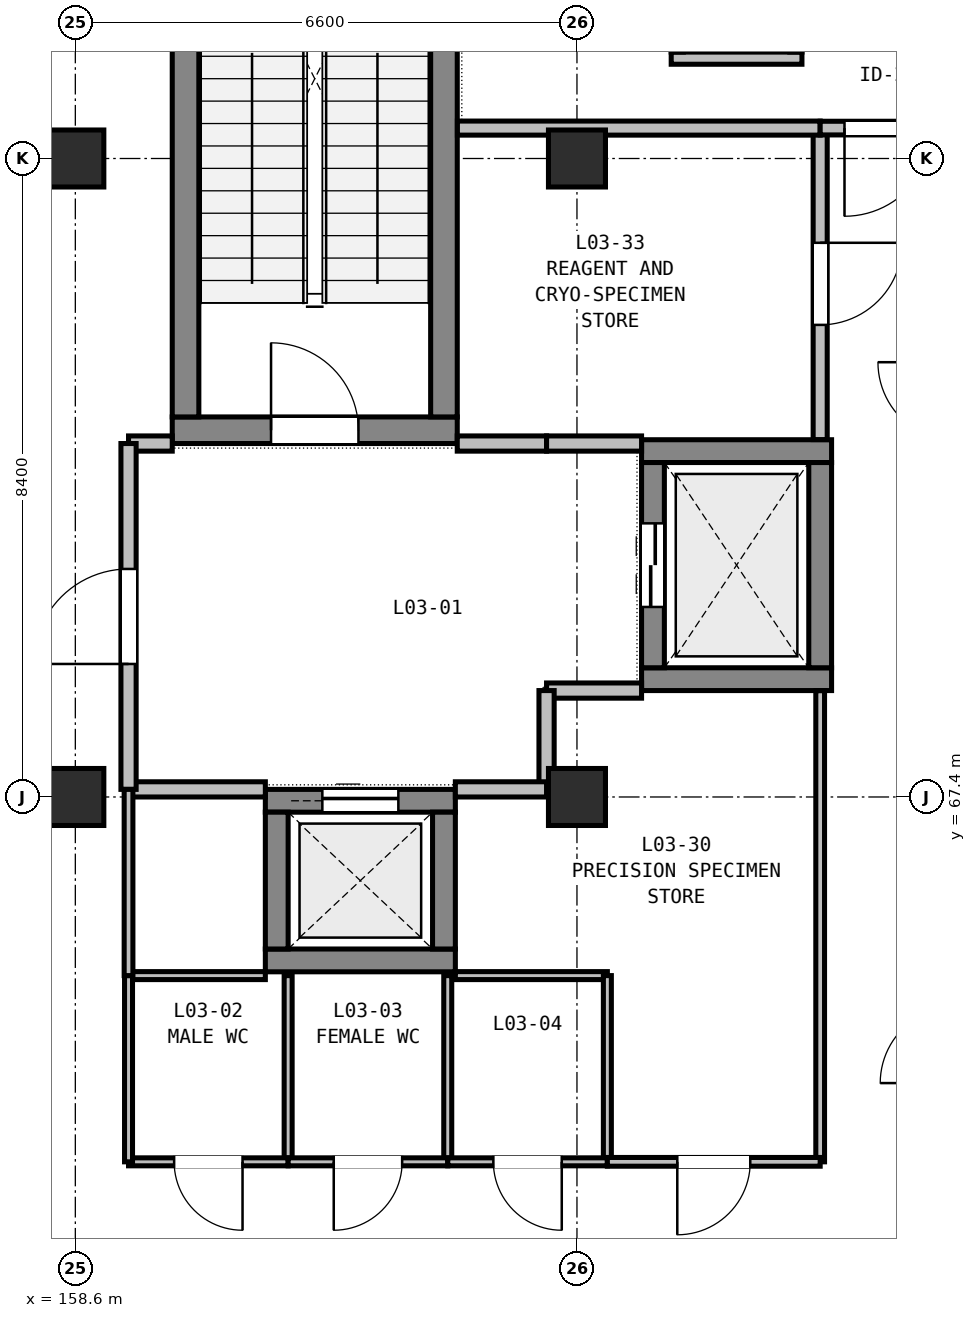
"""IFC4 building model, lengths in metres.
Left out: names, types, materials, properties, quantities, classifications, styles, units other than length and angle.
Written with IfcOpenShell. Run it as: python <this file> out.ifc"""

import sys

from ifc_helpers import new_model, si_unit, direction, frame, frame_2d, origin, origin_2d, place, context, subcontext, project, spatial, rectangle, extrude, element, fill, save


model = new_model("IFC4")
c1 = context("Model", 3, precision=1e-05, world=origin(), true_north=direction((0.0, 1.0)))
c2 = subcontext(c1, "Body", "Model", "MODEL_VIEW")
j1 = project(units=[si_unit("LENGTHUNIT", "METRE"), si_unit("PLANEANGLEUNIT", "RADIAN")], contexts=[c1])
p1 = place(None, origin())
s1 = spatial("IfcSite", under=j1, at=p1, CompositionType="ELEMENT")
p2 = place(p1, origin())
s2 = spatial("IfcBuilding", under=s1, at=p2, CompositionType="ELEMENT")
p3 = place(p2, frame((0.0, 0.0, 15.0)))
s3 = spatial("IfcBuildingStorey", under=s2, at=p3, CompositionType="ELEMENT", Elevation=15.0)
for number, where, z_axis, x_axis in (
    (1, (158.6, 67.4, 0.0), (0.0, 0.0, 1.0), (1.0, 0.0, 0.0)),
    (2, (158.6, 75.8, 0.0), (0.0, 0.0, 1.0), (1.0, 0.0, 0.0)),
    (3, (165.2, 67.4, 0.0), (0.0, 0.0, 1.0), (1.0, 0.0, 0.0)),
    (4, (165.2, 75.8, 0.0), (0.0, 0.0, 1.0), (1.0, 0.0, 0.0)),
):
    element("IfcColumn", number, at=place(p3, frame(where, z_axis=z_axis, x_axis=x_axis)), inside=s3, PredefinedType="COLUMN", context=c2, shape_type="SweptSolid", body=[
        extrude(rectangle(XDim=0.75, YDim=0.75, at=origin_2d()), origin(), (0.0, 0.0, 1.0), 4.5),
    ])
p4 = place(p3, frame((159.875, 72.225, 0.0), z_axis=(0.0, 0.0, 1.0), x_axis=(1.0, 0.0, 0.0)))
e5 = element("IfcWall", 5, at=p4, inside=s3, PredefinedType="SHEAR", context=c2, shape_type="SweptSolid", body=[
    extrude(rectangle(XDim=3.75, YDim=0.35, at=frame_2d((1.875, 0.0))), origin(), (0.0, 0.0, 1.0), 4.5),
])
p5 = place(p4, frame((1.3, 0.0, 0.0)))
e6 = element("IfcOpeningElement", 6, at=p5, cuts=e5, PredefinedType="OPENING", context=c2, shape_type="SweptSolid", body=[
    extrude(rectangle(XDim=1.15, YDim=2.15, at=frame_2d((0.575, 1.075))), frame((0.0, 0.185, 0.0), z_axis=(0.0, -1.0, 0.0), x_axis=(1.0, 0.0, 0.0)), (0.0, 0.0, 1.0), 0.37),
])
for number, where, z_axis, x_axis in (
    (7, (160.05, 72.4, 0.0), (0.0, 0.0, 1.0), (0.0, 1.0, 0.0)),
    (8, (163.45, 72.4, 0.0), (0.0, 0.0, 1.0), (0.0, 1.0, 0.0)),
):
    element("IfcWall", number, at=place(p3, frame(where, z_axis=z_axis, x_axis=x_axis)), inside=s3, PredefinedType="SHEAR", context=c2, shape_type="SweptSolid", body=[
        extrude(rectangle(XDim=7.375, YDim=0.35, at=frame_2d((3.688, 0.0))), origin(), (0.0, 0.0, 1.0), 4.5),
    ])
for number, where, z_axis, x_axis in (
    (9, (166.05, 68.95, 0.0), (0.0, 0.0, 1.0), (1.0, 0.0, 0.0)),
    (10, (166.05, 71.95, 0.0), (0.0, 0.0, 1.0), (1.0, 0.0, 0.0)),
):
    element("IfcWall", number, at=place(p3, frame(where, z_axis=z_axis, x_axis=x_axis)), inside=s3, PredefinedType="SHEAR", context=c2, shape_type="SweptSolid", body=[
        extrude(rectangle(XDim=2.5, YDim=0.3, at=frame_2d((1.25, 0.0))), origin(), (0.0, 0.0, 1.0), 4.5),
    ])
p6 = place(p3, frame((166.2, 69.1, 0.0), z_axis=(0.0, 0.0, 1.0), x_axis=(0.0, 1.0, 0.0)))
e11 = element("IfcWall", 11, at=p6, inside=s3, PredefinedType="SHEAR", context=c2, shape_type="SweptSolid", body=[
    extrude(rectangle(XDim=2.7, YDim=0.3, at=frame_2d((1.35, 0.0))), origin(), (0.0, 0.0, 1.0), 4.5),
])
p7 = place(p6, frame((0.8, 0.0, 0.0)))
e12 = element("IfcOpeningElement", 12, at=p7, cuts=e11, PredefinedType="OPENING", context=c2, shape_type="SweptSolid", body=[
    extrude(rectangle(XDim=1.1, YDim=2.1, at=frame_2d((0.55, 1.05))), frame((0.0, 0.16, 0.0), z_axis=(0.0, -1.0, 0.0), x_axis=(1.0, 0.0, 0.0)), (0.0, 0.0, 1.0), 0.32),
])
p8 = place(p3, frame((168.4, 69.1, 0.0), z_axis=(0.0, 0.0, 1.0), x_axis=(0.0, 1.0, 0.0)))
e13 = element("IfcWall", 13, at=p8, inside=s3, PredefinedType="SHEAR", context=c2, shape_type="SweptSolid", body=[
    extrude(rectangle(XDim=2.7, YDim=0.3, at=frame_2d((1.35, 0.0))), origin(), (0.0, 0.0, 1.0), 4.5),
])
p9 = place(p3, frame((161.1, 65.25, 0.0), z_axis=(0.0, 0.0, 1.0), x_axis=(1.0, 0.0, 0.0)))
e14 = element("IfcWall", 14, at=p9, inside=s3, PredefinedType="SHEAR", context=c2, shape_type="SweptSolid", body=[
    extrude(rectangle(XDim=2.5, YDim=0.3, at=frame_2d((1.25, 0.0))), origin(), (0.0, 0.0, 1.0), 4.5),
])
p10 = place(p3, frame((161.1, 67.35, 0.0), z_axis=(0.0, 0.0, 1.0), x_axis=(1.0, 0.0, 0.0)))
e15 = element("IfcWall", 15, at=p10, inside=s3, PredefinedType="SHEAR", context=c2, shape_type="SweptSolid", body=[
    extrude(rectangle(XDim=2.5, YDim=0.3, at=frame_2d((1.25, 0.0))), origin(), (0.0, 0.0, 1.0), 4.5),
])
p11 = place(p10, frame((0.75, 0.0, 0.0)))
e16 = element("IfcOpeningElement", 16, at=p11, cuts=e15, PredefinedType="OPENING", context=c2, shape_type="SweptSolid", body=[
    extrude(rectangle(XDim=1.0, YDim=2.1, at=frame_2d((0.5, 1.05))), frame((0.0, 0.16, 0.0), z_axis=(0.0, -1.0, 0.0), x_axis=(1.0, 0.0, 0.0)), (0.0, 0.0, 1.0), 0.32),
])
for number, where, z_axis, x_axis in (
    (17, (161.25, 65.4, 0.0), (0.0, 0.0, 1.0), (0.0, 1.0, 0.0)),
    (18, (163.45, 65.4, 0.0), (0.0, 0.0, 1.0), (0.0, 1.0, 0.0)),
):
    element("IfcWall", number, at=place(p3, frame(where, z_axis=z_axis, x_axis=x_axis)), inside=s3, PredefinedType="SHEAR", context=c2, shape_type="SweptSolid", body=[
        extrude(rectangle(XDim=1.8, YDim=0.3, at=frame_2d((0.9, 0.0))), origin(), (0.0, 0.0, 1.0), 4.5),
    ])
p12 = place(p3, frame((166.44, 77.12, 0.0), z_axis=(0.0, 0.0, 1.0), x_axis=(1.0, 0.0, 0.0)))
e19 = element("IfcWall", 19, at=p12, inside=s3, PredefinedType="PARTITIONING", context=c2, shape_type="SweptSolid", body=[
    extrude(rectangle(XDim=1.72, YDim=0.16, at=frame_2d((0.86, 0.0))), origin(), (0.0, 0.0, 1.0), 4.195),
])
p13 = place(p3, frame((159.3, 72.05, 0.0), z_axis=(0.0, 0.0, 1.0), x_axis=(1.0, 0.0, 0.0)))
e20 = element("IfcWall", 20, at=p13, inside=s3, PredefinedType="PARTITIONING", context=c2, shape_type="SweptSolid", body=[
    extrude(rectangle(XDim=0.575, YDim=0.2, at=frame_2d((0.288, 0.0))), origin(), (0.0, 0.0, 1.0), 4.195),
])
p14 = place(p3, frame((163.625, 72.05, 0.0), z_axis=(0.0, 0.0, 1.0), x_axis=(1.0, 0.0, 0.0)))
e21 = element("IfcWall", 21, at=p14, inside=s3, PredefinedType="PARTITIONING", context=c2, shape_type="SweptSolid", body=[
    extrude(rectangle(XDim=1.175, YDim=0.2, at=frame_2d((0.587, 0.0))), origin(), (0.0, 0.0, 1.0), 4.195),
])
for number, where, z_axis, x_axis in (
    (22, (164.8, 72.05, 0.0), (0.0, 0.0, 1.0), (1.0, 0.0, 0.0)),
    (23, (166.05, 68.8, 0.0), (0.0, 0.0, 1.0), (-1.0, 0.0, 0.0)),
):
    element("IfcWall", number, at=place(p3, frame(where, z_axis=z_axis, x_axis=x_axis)), inside=s3, PredefinedType="PARTITIONING", context=c2, shape_type="SweptSolid", body=[
        extrude(rectangle(XDim=1.25, YDim=0.2, at=frame_2d((0.625, 0.0))), origin(), (0.0, 0.0, 1.0), 3.735),
    ])
p15 = place(p3, frame((164.8, 68.8, 0.0), z_axis=(0.0, 0.0, 1.0), x_axis=(0.0, -1.0, 0.0)))
e24 = element("IfcWall", 24, at=p15, inside=s3, PredefinedType="PARTITIONING", context=c2, shape_type="SweptSolid", body=[
    extrude(rectangle(XDim=1.3, YDim=0.2, at=frame_2d((0.65, 0.0))), origin(), (0.0, 0.0, 1.0), 3.835),
])
p16 = place(p3, frame((164.8, 67.5, 0.0), z_axis=(0.0, 0.0, 1.0), x_axis=(-1.0, 0.0, 0.0)))
e25 = element("IfcWall", 25, at=p16, inside=s3, PredefinedType="PARTITIONING", context=c2, shape_type="SweptSolid", body=[
    extrude(rectangle(XDim=1.2, YDim=0.2, at=frame_2d((0.6, 0.0))), origin(), (0.0, 0.0, 1.0), 3.835),
])
p17 = place(p3, frame((161.1, 67.5, 0.0), z_axis=(0.0, 0.0, 1.0), x_axis=(-1.0, 0.0, 0.0)))
e26 = element("IfcWall", 26, at=p17, inside=s3, PredefinedType="PARTITIONING", context=c2, shape_type="SweptSolid", body=[
    extrude(rectangle(XDim=1.8, YDim=0.2, at=frame_2d((0.9, 0.0))), origin(), (0.0, 0.0, 1.0), 3.835),
])
p18 = place(p3, frame((159.3, 67.5, 0.0), z_axis=(0.0, 0.0, 1.0), x_axis=(0.0, 1.0, 0.0)))
e27 = element("IfcWall", 27, at=p18, inside=s3, PredefinedType="PARTITIONING", context=c2, shape_type="SweptSolid", body=[
    extrude(rectangle(XDim=4.55, YDim=0.2, at=frame_2d((2.275, 0.0))), origin(), (0.0, 0.0, 1.0), 3.835),
])
p19 = place(p18, frame((1.65, 0.0, 0.0)))
e28 = element("IfcOpeningElement", 28, at=p19, cuts=e27, PredefinedType="OPENING", context=c2, shape_type="SweptSolid", body=[
    extrude(rectangle(XDim=1.25, YDim=2.15, at=frame_2d((0.625, 1.075))), frame((0.0, 0.11, 0.0), z_axis=(0.0, -1.0, 0.0), x_axis=(1.0, 0.0, 0.0)), (0.0, 0.0, 1.0), 0.22),
])
p20 = place(p3, frame((159.3, 65.05, 0.0), z_axis=(0.0, 0.0, 1.0), x_axis=(1.0, 0.0, 0.0)))
e29 = element("IfcWall", 29, at=p20, inside=s3, PredefinedType="PARTITIONING", context=c2, shape_type="SweptSolid", body=[
    extrude(rectangle(XDim=1.8, YDim=0.105, at=frame_2d((0.9, 0.0))), origin(), (0.0, 0.0, 1.0), 4.195),
])
p21 = place(p3, frame((161.4, 65.05, 0.0), z_axis=(0.0, 0.0, 1.0), x_axis=(0.0, -1.0, 0.0)))
e30 = element("IfcWall", 30, at=p21, inside=s3, PredefinedType="PARTITIONING", context=c2, shape_type="SweptSolid", body=[
    extrude(rectangle(XDim=2.45, YDim=0.105, at=frame_2d((1.225, 0.0))), origin(), (0.0, 0.0, 1.0), 4.195),
])
p22 = place(p3, frame((161.4, 62.6, 0.0), z_axis=(0.0, 0.0, 1.0), x_axis=(-1.0, 0.0, 0.0)))
e31 = element("IfcWall", 31, at=p22, inside=s3, PredefinedType="PARTITIONING", context=c2, shape_type="SweptSolid", body=[
    extrude(rectangle(XDim=2.1, YDim=0.105, at=frame_2d((1.05, 0.0))), origin(), (0.0, 0.0, 1.0), 4.195),
])
p23 = place(p22, frame((0.6, 0.0, 0.0)))
e32 = element("IfcOpeningElement", 32, at=p23, cuts=e31, PredefinedType="OPENING", context=c2, shape_type="SweptSolid", body=[
    extrude(rectangle(XDim=0.9, YDim=2.02, at=frame_2d((0.45, 1.01))), frame((0.0, 0.062, 0.0), z_axis=(0.0, -1.0, 0.0), x_axis=(1.0, 0.0, 0.0)), (0.0, 0.0, 1.0), 0.125),
])
for number, where, z_axis, x_axis in (
    (33, (159.3, 62.6, 0.0), (0.0, 0.0, 1.0), (0.0, 1.0, 0.0)),
    (34, (163.5, 65.05, 0.0), (0.0, 0.0, 1.0), (0.0, -1.0, 0.0)),
):
    element("IfcWall", number, at=place(p3, frame(where, z_axis=z_axis, x_axis=x_axis)), inside=s3, PredefinedType="PARTITIONING", context=c2, shape_type="SweptSolid", body=[
        extrude(rectangle(XDim=2.45, YDim=0.105, at=frame_2d((1.225, 0.0))), origin(), (0.0, 0.0, 1.0), 4.195),
    ])
p24 = place(p3, frame((163.5, 62.6, 0.0), z_axis=(0.0, 0.0, 1.0), x_axis=(-1.0, 0.0, 0.0)))
e35 = element("IfcWall", 35, at=p24, inside=s3, PredefinedType="PARTITIONING", context=c2, shape_type="SweptSolid", body=[
    extrude(rectangle(XDim=2.1, YDim=0.105, at=frame_2d((1.05, 0.0))), origin(), (0.0, 0.0, 1.0), 4.195),
])
p25 = place(p24, frame((0.6, 0.0, 0.0)))
e36 = element("IfcOpeningElement", 36, at=p25, cuts=e35, PredefinedType="OPENING", context=c2, shape_type="SweptSolid", body=[
    extrude(rectangle(XDim=0.9, YDim=2.02, at=frame_2d((0.45, 1.01))), frame((0.0, 0.062, 0.0), z_axis=(0.0, -1.0, 0.0), x_axis=(1.0, 0.0, 0.0)), (0.0, 0.0, 1.0), 0.125),
])
p26 = place(p3, frame((163.6, 65.05, 0.0), z_axis=(0.0, 0.0, 1.0), x_axis=(1.0, 0.0, 0.0)))
e37 = element("IfcWall", 37, at=p26, inside=s3, PredefinedType="PARTITIONING", context=c2, shape_type="SweptSolid", body=[
    extrude(rectangle(XDim=2.0, YDim=0.105, at=frame_2d((1.0, 0.0))), origin(), (0.0, 0.0, 1.0), 3.735),
])
p27 = place(p3, frame((165.6, 65.05, 0.0), z_axis=(0.0, 0.0, 1.0), x_axis=(0.0, -1.0, 0.0)))
e38 = element("IfcWall", 38, at=p27, inside=s3, PredefinedType="PARTITIONING", context=c2, shape_type="SweptSolid", body=[
    extrude(rectangle(XDim=2.45, YDim=0.105, at=frame_2d((1.225, 0.0))), origin(), (0.0, 0.0, 1.0), 4.195),
])
p28 = place(p3, frame((165.6, 62.6, 0.0), z_axis=(0.0, 0.0, 1.0), x_axis=(-1.0, 0.0, 0.0)))
e39 = element("IfcWall", 39, at=p28, inside=s3, PredefinedType="PARTITIONING", context=c2, shape_type="SweptSolid", body=[
    extrude(rectangle(XDim=2.1, YDim=0.105, at=frame_2d((1.05, 0.0))), origin(), (0.0, 0.0, 1.0), 3.735),
])
p29 = place(p28, frame((0.6, 0.0, 0.0)))
e40 = element("IfcOpeningElement", 40, at=p29, cuts=e39, PredefinedType="OPENING", context=c2, shape_type="SweptSolid", body=[
    extrude(rectangle(XDim=0.9, YDim=2.02, at=frame_2d((0.45, 1.01))), frame((0.0, 0.062, 0.0), z_axis=(0.0, -1.0, 0.0), x_axis=(1.0, 0.0, 0.0)), (0.0, 0.0, 1.0), 0.125),
])
p30 = place(p3, frame((168.4, 68.798, 0.0), z_axis=(0.0, 0.0, 1.0), x_axis=(0.0, -1.0, 0.0)))
e41 = element("IfcWall", 41, at=p30, inside=s3, PredefinedType="PARTITIONING", context=c2, shape_type="SweptSolid", body=[
    extrude(rectangle(XDim=6.198, YDim=0.115, at=frame_2d((3.099, 0.0))), origin(), (0.0, 0.0, 1.0), 3.835),
])
p31 = place(p3, frame((168.4, 62.6, 0.0), z_axis=(0.0, 0.0, 1.0), x_axis=(-1.0, 0.0, 0.0)))
e42 = element("IfcWall", 42, at=p31, inside=s3, PredefinedType="PARTITIONING", context=c2, shape_type="SweptSolid", body=[
    extrude(rectangle(XDim=2.8, YDim=0.115, at=frame_2d((1.4, 0.0))), origin(), (0.0, 0.0, 1.0), 3.985),
])
p32 = place(p31, frame((0.92, 0.0, 0.0)))
e43 = element("IfcOpeningElement", 43, at=p32, cuts=e42, PredefinedType="OPENING", context=c2, shape_type="SweptSolid", body=[
    extrude(rectangle(XDim=0.96, YDim=2.14, at=frame_2d((0.48, 1.07))), frame((0.0, 0.067, 0.0), z_axis=(0.0, -1.0, 0.0), x_axis=(1.0, 0.0, 0.0)), (0.0, 0.0, 1.0), 0.135),
])
p33 = place(p3, frame((159.3, 65.05, 0.0), z_axis=(0.0, 0.0, 1.0), x_axis=(0.0, 1.0, 0.0)))
e44 = element("IfcWall", 44, at=p33, inside=s3, PredefinedType="PARTITIONING", context=c2, shape_type="SweptSolid", body=[
    extrude(rectangle(XDim=2.45, YDim=0.115, at=frame_2d((1.225, 0.0))), origin(), (0.0, 0.0, 1.0), 3.835),
])
p34 = place(p3, frame((168.4, 76.2, 0.0), z_axis=(0.0, 0.0, 1.0), x_axis=(0.0, -1.0, 0.0)))
e45 = element("IfcWall", 45, at=p34, inside=s3, PredefinedType="PARTITIONING", context=c2, shape_type="SweptSolid", body=[
    extrude(rectangle(XDim=4.098, YDim=0.185, at=frame_2d((2.049, 0.0))), origin(), (0.0, 0.0, 1.0), 3.835),
])
p35 = place(p34, frame((1.509, 0.0, 0.0)))
e46 = element("IfcOpeningElement", 46, at=p35, cuts=e45, PredefinedType="OPENING", context=c2, shape_type="SweptSolid", body=[
    extrude(rectangle(XDim=1.08, YDim=2.14, at=frame_2d((0.54, 1.07))), frame((0.0, 0.103, 0.0), z_axis=(0.0, -1.0, 0.0), x_axis=(1.0, 0.0, 0.0)), (0.0, 0.0, 1.0), 0.205),
])
p36 = place(p3, frame((163.627, 76.2, 0.0), z_axis=(0.0, 0.0, 1.0), x_axis=(1.0, 0.0, 0.0)))
e47 = element("IfcWall", 47, at=p36, inside=s3, PredefinedType="PARTITIONING", context=c2, shape_type="SweptSolid", body=[
    extrude(rectangle(XDim=4.773, YDim=0.185, at=frame_2d((2.386, 0.0))), origin(), (0.0, 0.0, 1.0), 3.735),
])
p37 = place(p3, frame((170.2, 76.2, 0.0), z_axis=(0.0, 0.0, 1.0), x_axis=(-1.0, 0.0, 0.0)))
e48 = element("IfcWall", 48, at=p37, inside=s3, PredefinedType="PARTITIONING", context=c2, shape_type="SweptSolid", body=[
    extrude(rectangle(XDim=1.8, YDim=0.18, at=frame_2d((0.9, 0.0))), origin(), (0.0, 0.0, 1.0), 3.985),
])
p38 = place(p37, frame((0.32, 0.0, 0.0)))
e49 = element("IfcOpeningElement", 49, at=p38, cuts=e48, PredefinedType="OPENING", context=c2, shape_type="SweptSolid", body=[
    extrude(rectangle(XDim=1.16, YDim=2.14, at=frame_2d((0.58, 1.07))), frame((0.0, 0.1, 0.0), z_axis=(0.0, -1.0, 0.0), x_axis=(1.0, 0.0, 0.0)), (0.0, 0.0, 1.0), 0.2),
])
p39 = place(p5, origin())
e50 = element("IfcDoor", 50, at=p39, inside=s3, OperationType="SINGLE_SWING_LEFT", PredefinedType="DOOR", context=c2, shape_type="SweptSolid", body=[
    extrude(rectangle(XDim=1.15, YDim=2.15, at=frame_2d((0.575, 1.075))), frame((0.0, 0.025, 0.0), z_axis=(0.0, -1.0, 0.0), x_axis=(1.0, 0.0, 0.0)), (0.0, 0.0, 1.0), 0.05),
])
fill(e6, e50)
p40 = place(p7, origin())
e51 = element("IfcDoor", 51, at=p40, inside=s3, OperationType="DOUBLE_DOOR_SLIDING", PredefinedType="DOOR", context=c2, shape_type="SweptSolid", body=[
    extrude(rectangle(XDim=1.1, YDim=2.1, at=frame_2d((0.55, 1.05))), frame((0.0, 0.025, 0.0), z_axis=(0.0, -1.0, 0.0), x_axis=(1.0, 0.0, 0.0)), (0.0, 0.0, 1.0), 0.05),
])
fill(e12, e51)
p41 = place(p11, origin())
e52 = element("IfcDoor", 52, at=p41, inside=s3, OperationType="SLIDING_TO_LEFT", PredefinedType="DOOR", context=c2, shape_type="SweptSolid", body=[
    extrude(rectangle(XDim=1.0, YDim=2.1, at=frame_2d((0.5, 1.05))), frame((0.0, 0.025, 0.0), z_axis=(0.0, -1.0, 0.0), x_axis=(1.0, 0.0, 0.0)), (0.0, 0.0, 1.0), 0.05),
])
fill(e16, e52)
p42 = place(p19, origin())
e53 = element("IfcDoor", 53, at=p42, inside=s3, OperationType="SINGLE_SWING_LEFT", PredefinedType="DOOR", context=c2, shape_type="SweptSolid", body=[
    extrude(rectangle(XDim=1.25, YDim=2.15, at=frame_2d((0.625, 1.075))), frame((0.0, 0.025, 0.0), z_axis=(0.0, -1.0, 0.0), x_axis=(1.0, 0.0, 0.0)), (0.0, 0.0, 1.0), 0.05),
])
fill(e28, e53)
p43 = place(p23, origin())
e54 = element("IfcDoor", 54, at=p43, inside=s3, OperationType="SINGLE_SWING_LEFT", PredefinedType="DOOR", context=c2, shape_type="SweptSolid", body=[
    extrude(rectangle(XDim=0.9, YDim=2.02, at=frame_2d((0.45, 1.01))), frame((0.0, 0.025, 0.0), z_axis=(0.0, -1.0, 0.0), x_axis=(1.0, 0.0, 0.0)), (0.0, 0.0, 1.0), 0.05),
])
fill(e32, e54)
p44 = place(p25, origin())
e55 = element("IfcDoor", 55, at=p44, inside=s3, OperationType="SINGLE_SWING_RIGHT", PredefinedType="DOOR", context=c2, shape_type="SweptSolid", body=[
    extrude(rectangle(XDim=0.9, YDim=2.02, at=frame_2d((0.45, 1.01))), frame((0.0, 0.025, 0.0), z_axis=(0.0, -1.0, 0.0), x_axis=(1.0, 0.0, 0.0)), (0.0, 0.0, 1.0), 0.05),
])
fill(e36, e55)
p45 = place(p29, origin())
e56 = element("IfcDoor", 56, at=p45, inside=s3, OperationType="SINGLE_SWING_LEFT", PredefinedType="DOOR", context=c2, shape_type="SweptSolid", body=[
    extrude(rectangle(XDim=0.9, YDim=2.02, at=frame_2d((0.45, 1.01))), frame((0.0, 0.025, 0.0), z_axis=(0.0, -1.0, 0.0), x_axis=(1.0, 0.0, 0.0)), (0.0, 0.0, 1.0), 0.05),
])
fill(e40, e56)
p46 = place(p32, origin())
e57 = element("IfcDoor", 57, at=p46, inside=s3, OperationType="SINGLE_SWING_RIGHT", PredefinedType="DOOR", context=c2, shape_type="SweptSolid", body=[
    extrude(rectangle(XDim=0.96, YDim=2.14, at=frame_2d((0.48, 1.07))), frame((0.0, 0.025, 0.0), z_axis=(0.0, -1.0, 0.0), x_axis=(1.0, 0.0, 0.0)), (0.0, 0.0, 1.0), 0.05),
])
fill(e43, e57)
p47 = place(p35, origin())
e58 = element("IfcDoor", 58, at=p47, inside=s3, OperationType="SINGLE_SWING_LEFT", PredefinedType="DOOR", context=c2, shape_type="SweptSolid", body=[
    extrude(rectangle(XDim=1.08, YDim=2.14, at=frame_2d((0.54, 1.07))), frame((0.0, 0.025, 0.0), z_axis=(0.0, -1.0, 0.0), x_axis=(1.0, 0.0, 0.0)), (0.0, 0.0, 1.0), 0.05),
])
fill(e46, e58)
p48 = place(p38, origin())
e59 = element("IfcDoor", 59, at=p48, inside=s3, OperationType="SINGLE_SWING_RIGHT", PredefinedType="DOOR", context=c2, shape_type="SweptSolid", body=[
    extrude(rectangle(XDim=1.16, YDim=2.14, at=frame_2d((0.58, 1.07))), frame((0.0, 0.025, 0.0), z_axis=(0.0, -1.0, 0.0), x_axis=(1.0, 0.0, 0.0)), (0.0, 0.0, 1.0), 0.05),
])
fill(e49, e59)
save(model, sys.argv[1])
